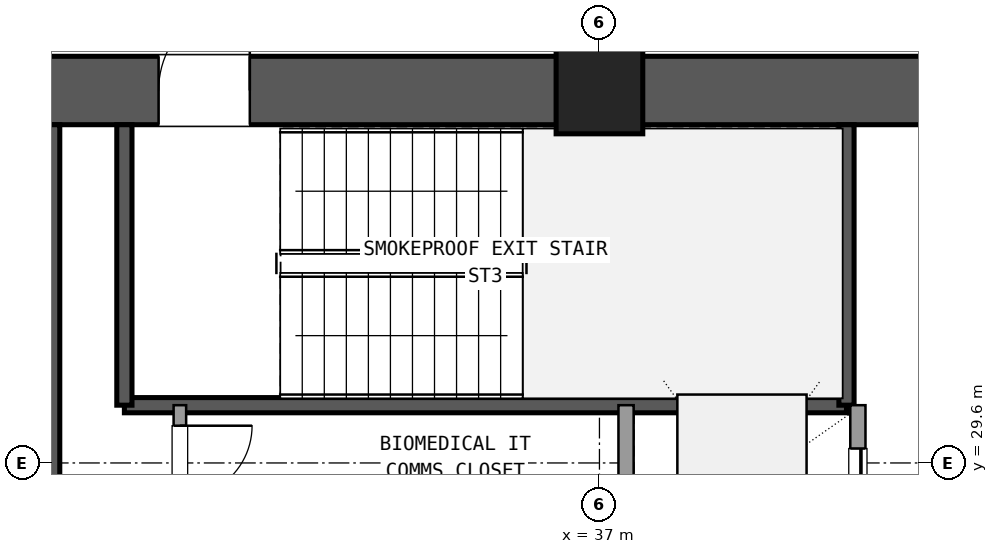
"""IFC4 building model, lengths in metres.
Left out: names, types, materials, properties, quantities, classifications, styles, units other than length and angle.
Written with IfcOpenShell. Run it as: python <this file> out.ifc"""

import sys

from ifc_helpers import new_model, si_unit, direction, frame, frame_2d, origin, origin_2d, place, context, subcontext, project, spatial, rectangle, extrude, element, fill, save


model = new_model("IFC4")
c1 = context("Model", 3, precision=1e-05, world=origin(), true_north=direction((0.0, 1.0)))
c2 = subcontext(c1, "Body", "Model", "MODEL_VIEW")
j1 = project(units=[si_unit("LENGTHUNIT", "METRE"), si_unit("PLANEANGLEUNIT", "RADIAN")], contexts=[c1])
p1 = place(None, origin())
s1 = spatial("IfcSite", under=j1, at=p1, CompositionType="ELEMENT")
p2 = place(p1, origin())
s2 = spatial("IfcBuilding", under=s1, at=p2, CompositionType="ELEMENT")
p3 = place(p2, frame((0.0, 0.0, 14.4)))
s3 = spatial("IfcBuildingStorey", under=s2, at=p3, CompositionType="ELEMENT", Elevation=14.4)
p4 = place(p3, frame((37.0, 34.5, 0.0), z_axis=(0.0, 0.0, 1.0), x_axis=(1.0, 0.0, 0.0)))
e1 = element("IfcColumn", 1, at=p4, inside=s3, PredefinedType="COLUMN", context=c2, shape_type="SweptSolid", body=[
    extrude(rectangle(XDim=1.14, YDim=1.14, at=origin_2d()), origin(), (0.0, 0.0, 1.0), 4.5),
])
p5 = place(p3, frame((47.635, 34.5, 0.0), z_axis=(0.0, 0.0, 1.0), x_axis=(-1.0, 0.0, 0.0)))
e2 = element("IfcWall", 2, at=p5, inside=s3, PredefinedType="SHEAR", context=c2, shape_type="SweptSolid", body=[
    extrude(rectangle(XDim=10.07, YDim=0.9, at=frame_2d((5.035, 0.0))), origin(), (0.0, 0.0, 1.0), 4.2),
])
p6 = place(p5, frame((4.535, 0.0, 0.0)))
e3 = element("IfcOpeningElement", 3, at=p6, cuts=e2, PredefinedType="OPENING", context=c2, shape_type="SweptSolid", body=[
    extrude(rectangle(XDim=1.6, YDim=2.2, at=frame_2d((0.8, 1.1))), frame((0.0, 0.46, 0.0), z_axis=(0.0, -1.0, 0.0), x_axis=(1.0, 0.0, 0.0)), (0.0, 0.0, 1.0), 0.92),
])
p7 = place(p3, frame((36.435, 34.5, 0.0), z_axis=(0.0, 0.0, 1.0), x_axis=(-1.0, 0.0, 0.0)))
e4 = element("IfcWall", 4, at=p7, inside=s3, PredefinedType="SHEAR", context=c2, shape_type="SweptSolid", body=[
    extrude(rectangle(XDim=10.07, YDim=0.9, at=frame_2d((5.035, 0.0))), origin(), (0.0, 0.0, 1.0), 4.2),
])
p8 = place(p7, frame((4.035, 0.0, 0.0)))
e5 = element("IfcOpeningElement", 5, at=p8, cuts=e4, PredefinedType="OPENING", context=c2, shape_type="SweptSolid", body=[
    extrude(rectangle(XDim=1.2, YDim=2.15, at=frame_2d((0.6, 1.075))), frame((0.0, 0.46, 0.0), z_axis=(0.0, -1.0, 0.0), x_axis=(1.0, 0.0, 0.0)), (0.0, 0.0, 1.0), 0.92),
])
p9 = place(p3, frame((29.8, 24.65, 0.0), z_axis=(0.0, 0.0, 1.0), x_axis=(0.0, 1.0, 0.0)))
e6 = element("IfcWall", 6, at=p9, inside=s3, PredefinedType="SHEAR", context=c2, shape_type="SweptSolid", body=[
    extrude(rectangle(XDim=9.4, YDim=0.2, at=frame_2d((4.7, 0.0))), origin(), (0.0, 0.0, 1.0), 4.2),
])
p10 = place(p3, frame((30.75, 30.36, 0.0), z_axis=(0.0, 0.0, 1.0), x_axis=(1.0, 0.0, 0.0)))
e7 = element("IfcWall", 7, at=p10, inside=s3, PredefinedType="SHEAR", context=c2, shape_type="SweptSolid", body=[
    extrude(rectangle(XDim=9.5, YDim=0.2, at=frame_2d((4.75, 0.0))), origin(), (0.0, 0.0, 1.0), 4.2),
])
for number, where, z_axis, x_axis in (
    (8, (30.75, 30.36, 0.0), (0.0, 0.0, 1.0), (0.0, 1.0, 0.0)),
    (9, (40.25, 30.36, 0.0), (0.0, 0.0, 1.0), (0.0, 1.0, 0.0)),
):
    element("IfcWall", number, at=place(p3, frame(where, z_axis=z_axis, x_axis=x_axis)), inside=s3, PredefinedType="SHEAR", context=c2, shape_type="SweptSolid", body=[
        extrude(rectangle(XDim=3.69, YDim=0.2, at=frame_2d((1.845, 0.0))), origin(), (0.0, 0.0, 1.0), 4.2),
    ])
p11 = place(p3, frame((37.35, 23.54, 0.0), z_axis=(0.0, 0.0, 1.0), x_axis=(0.0, 1.0, 0.0)))
e10 = element("IfcWall", 10, at=p11, inside=s3, PredefinedType="SOLIDWALL", context=c2, shape_type="SweptSolid", body=[
    extrude(rectangle(XDim=6.82, YDim=0.2, at=frame_2d((3.41, 0.0))), origin(), (0.0, 0.0, 1.0), 3.21),
])
p12 = place(p3, frame((40.4, 23.54, 0.0), z_axis=(0.0, 0.0, 1.0), x_axis=(0.0, 1.0, 0.0)))
e11 = element("IfcWall", 11, at=p12, inside=s3, PredefinedType="SOLIDWALL", context=c2, shape_type="SweptSolid", body=[
    extrude(rectangle(XDim=6.82, YDim=0.2, at=frame_2d((3.41, 0.0))), origin(), (0.0, 0.0, 1.0), 3.21),
])
p13 = place(p12, frame((0.35, 0.0, 0.0)))
e12 = element("IfcOpeningElement", 12, at=p13, cuts=e11, PredefinedType="OPENING", context=c2, shape_type="SweptSolid", body=[
    extrude(rectangle(XDim=1.4, YDim=2.2, at=frame_2d((0.7, 1.1))), frame((0.0, 0.11, 0.0), z_axis=(0.0, -1.0, 0.0), x_axis=(1.0, 0.0, 0.0)), (0.0, 0.0, 1.0), 0.22),
])
p14 = place(p12, frame((2.65, 0.0, 0.0)))
e13 = element("IfcOpeningElement", 13, at=p14, cuts=e11, PredefinedType="OPENING", context=c2, shape_type="SweptSolid", body=[
    extrude(rectangle(XDim=1.4, YDim=2.2, at=frame_2d((0.7, 1.1))), frame((0.0, 0.11, 0.0), z_axis=(0.0, -1.0, 0.0), x_axis=(1.0, 0.0, 0.0)), (0.0, 0.0, 1.0), 0.22),
])
p15 = place(p12, frame((4.85, 0.0, 0.0)))
e14 = element("IfcOpeningElement", 14, at=p15, cuts=e11, PredefinedType="OPENING", context=c2, shape_type="SweptSolid", body=[
    extrude(rectangle(XDim=1.4, YDim=2.2, at=frame_2d((0.7, 1.1))), frame((0.0, 0.11, 0.0), z_axis=(0.0, -1.0, 0.0), x_axis=(1.0, 0.0, 0.0)), (0.0, 0.0, 1.0), 0.22),
])
p16 = place(p3, frame((31.48, 26.32, 0.0), z_axis=(0.0, 0.0, 1.0), x_axis=(0.0, 1.0, 0.0)))
e15 = element("IfcWall", 15, at=p16, inside=s3, PredefinedType="PLUMBINGWALL", context=c2, shape_type="SweptSolid", body=[
    extrude(rectangle(XDim=4.04, YDim=0.165, at=frame_2d((2.02, 0.0))), origin(), (0.0, 0.0, 1.0), 3.21),
])
p17 = place(p16, frame((0.18, 0.0, 0.0)))
e16 = element("IfcOpeningElement", 16, at=p17, cuts=e15, PredefinedType="OPENING", context=c2, shape_type="SweptSolid", body=[
    extrude(rectangle(XDim=0.95, YDim=2.1, at=frame_2d((0.475, 1.05))), frame((0.0, 0.093, 0.0), z_axis=(0.0, -1.0, 0.0), x_axis=(1.0, 0.0, 0.0)), (0.0, 0.0, 1.0), 0.185),
])
p18 = place(p16, frame((1.5, 0.0, 0.0)))
e17 = element("IfcOpeningElement", 17, at=p18, cuts=e15, PredefinedType="OPENING", context=c2, shape_type="SweptSolid", body=[
    extrude(rectangle(XDim=0.95, YDim=2.1, at=frame_2d((0.475, 1.05))), frame((0.0, 0.093, 0.0), z_axis=(0.0, -1.0, 0.0), x_axis=(1.0, 0.0, 0.0)), (0.0, 0.0, 1.0), 0.185),
])
p19 = place(p16, frame((2.82, 0.0, 0.0)))
e18 = element("IfcOpeningElement", 18, at=p19, cuts=e15, PredefinedType="OPENING", context=c2, shape_type="SweptSolid", body=[
    extrude(rectangle(XDim=0.95, YDim=2.1, at=frame_2d((0.475, 1.05))), frame((0.0, 0.093, 0.0), z_axis=(0.0, -1.0, 0.0), x_axis=(1.0, 0.0, 0.0)), (0.0, 0.0, 1.0), 0.185),
])
p20 = place(p8, frame((1.2, 0.0, 0.0), z_axis=(0.0, 0.0, 1.0), x_axis=(-1.0, 0.0, 0.0)))
e19 = element("IfcDoor", 19, at=p20, inside=s3, OperationType="SINGLE_SWING_LEFT", PredefinedType="DOOR", context=c2, shape_type="SweptSolid", body=[
    extrude(rectangle(XDim=1.2, YDim=2.15, at=frame_2d((0.6, 1.075))), frame((0.0, 0.025, 0.0), z_axis=(0.0, -1.0, 0.0), x_axis=(1.0, 0.0, 0.0)), (0.0, 0.0, 1.0), 0.05),
])
fill(e5, e19)
p21 = place(p15, origin())
e20 = element("IfcDoor", 20, at=p21, inside=s3, OperationType="SLIDING_TO_RIGHT", PredefinedType="DOOR", context=c2, shape_type="SweptSolid", body=[
    extrude(rectangle(XDim=1.4, YDim=2.2, at=frame_2d((0.7, 1.1))), frame((0.0, 0.025, 0.0), z_axis=(0.0, -1.0, 0.0), x_axis=(1.0, 0.0, 0.0)), (0.0, 0.0, 1.0), 0.05),
])
fill(e14, e20)
p22 = place(p19, frame((0.95, 0.0, 0.0), z_axis=(0.0, 0.0, 1.0), x_axis=(-1.0, 0.0, 0.0)))
e21 = element("IfcDoor", 21, at=p22, inside=s3, OperationType="SINGLE_SWING_RIGHT", PredefinedType="DOOR", context=c2, shape_type="SweptSolid", body=[
    extrude(rectangle(XDim=0.95, YDim=2.1, at=frame_2d((0.475, 1.05))), frame((0.0, 0.025, 0.0), z_axis=(0.0, -1.0, 0.0), x_axis=(1.0, 0.0, 0.0)), (0.0, 0.0, 1.0), 0.05),
])
fill(e18, e21)
save(model, sys.argv[1])
